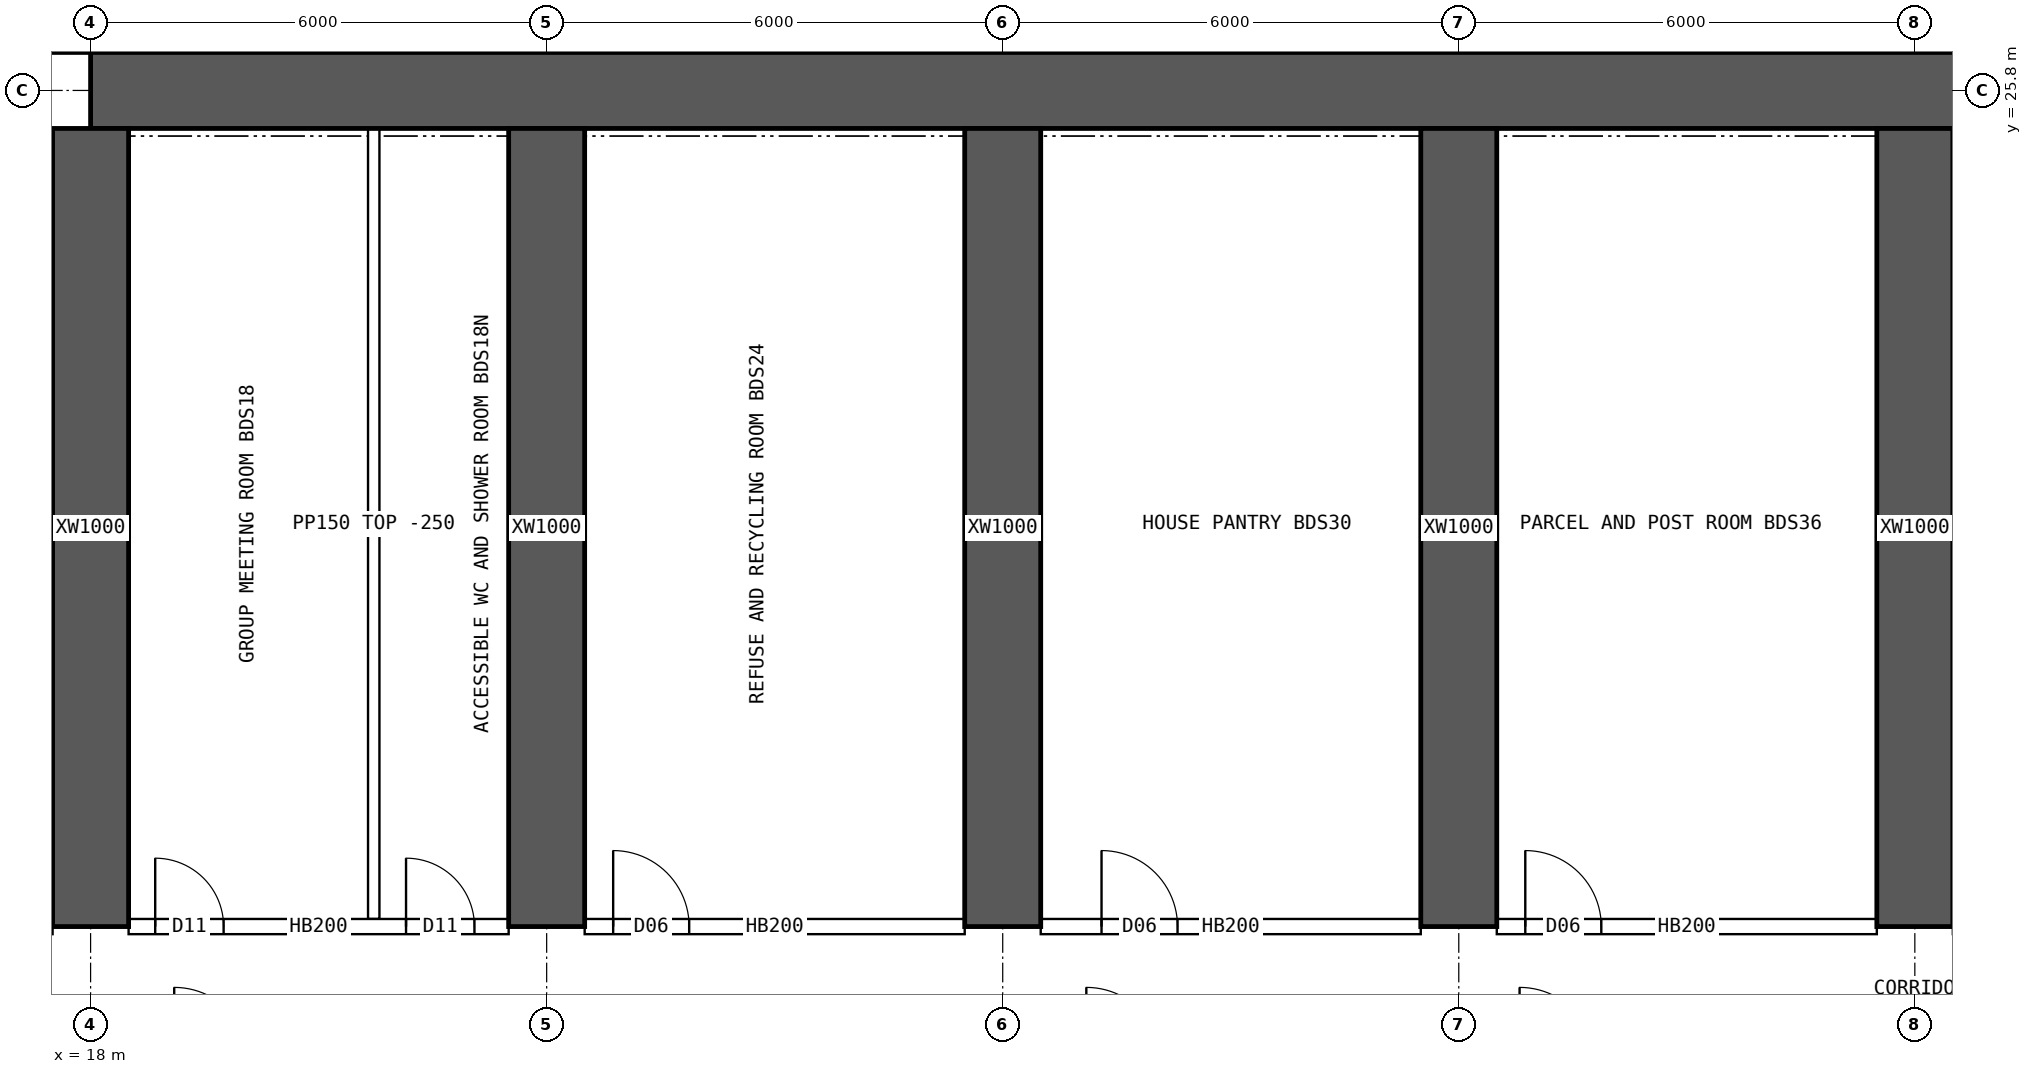
"""IFC4 building model, lengths in metres.
Left out: names, types, materials, properties, quantities, classifications, styles, units other than length and angle.
Written with IfcOpenShell. Run it as: python <this file> out.ifc"""

import sys

from ifc_helpers import new_model, si_unit, direction, frame, frame_2d, origin, place, context, subcontext, project, spatial, rectangle, extrude, element, fill, save


model = new_model("IFC4")
c1 = context("Model", 3, precision=1e-05, world=origin(), true_north=direction((0.0, 1.0)))
c2 = subcontext(c1, "Body", "Model", "MODEL_VIEW")
j1 = project(units=[si_unit("LENGTHUNIT", "METRE"), si_unit("PLANEANGLEUNIT", "RADIAN")], contexts=[c1])
p1 = place(None, origin())
s1 = spatial("IfcSite", under=j1, at=p1, CompositionType="ELEMENT")
p2 = place(p1, origin())
s2 = spatial("IfcBuilding", under=s1, at=p2, CompositionType="ELEMENT")
p3 = place(p2, frame((0.0, 0.0, 61.45)))
s3 = spatial("IfcBuildingStorey", under=s2, at=p3, CompositionType="ELEMENT", Elevation=61.45)
p4 = place(p3, frame((18.0, 25.8, 0.0), z_axis=(0.0, 0.0, 1.0), x_axis=(1.0, 0.0, 0.0)))
e1 = element("IfcWall", 1, at=p4, inside=s3, PredefinedType="SHEAR", context=c2, shape_type="SweptSolid", body=[
    extrude(rectangle(XDim=48.0, YDim=1.0, at=frame_2d((24.0, 0.0))), origin(), (0.0, 0.0, 1.0), 3.75),
])
for number, where, z_axis, x_axis in (
    (2, (18.0, 14.8, 0.0), (0.0, 0.0, 1.0), (0.0, 1.0, 0.0)),
    (3, (24.0, 14.8, 0.0), (0.0, 0.0, 1.0), (0.0, 1.0, 0.0)),
    (4, (30.0, 14.8, 0.0), (0.0, 0.0, 1.0), (0.0, 1.0, 0.0)),
    (5, (36.0, 14.8, 0.0), (0.0, 0.0, 1.0), (0.0, 1.0, 0.0)),
    (6, (42.0, 14.8, 0.0), (0.0, 0.0, 1.0), (0.0, 1.0, 0.0)),
):
    element("IfcWall", number, at=place(p3, frame(where, z_axis=z_axis, x_axis=x_axis)), inside=s3, PredefinedType="SHEAR", context=c2, shape_type="SweptSolid", body=[
        extrude(rectangle(XDim=10.5, YDim=1.0, at=frame_2d((5.25, 0.0))), origin(), (0.0, 0.0, 1.0), 3.75),
    ])
p5 = place(p3, frame((18.5, 14.8, 0.0), z_axis=(0.0, 0.0, 1.0), x_axis=(1.0, 0.0, 0.0)))
e7 = element("IfcWall", 7, at=p5, inside=s3, PredefinedType="SOLIDWALL", context=c2, shape_type="SweptSolid", body=[
    extrude(rectangle(XDim=5.0, YDim=0.2, at=frame_2d((2.5, 0.0))), origin(), (0.0, 0.0, 1.0), 3.5),
])
p6 = place(p5, frame((0.35, 0.0, 0.0)))
e8 = element("IfcOpeningElement", 8, at=p6, cuts=e7, PredefinedType="OPENING", context=c2, shape_type="SweptSolid", body=[
    extrude(rectangle(XDim=0.9, YDim=2.1, at=frame_2d((0.45, 1.05))), frame((0.0, 0.11, 0.0), z_axis=(0.0, -1.0, 0.0), x_axis=(1.0, 0.0, 0.0)), (0.0, 0.0, 1.0), 0.22),
])
p7 = place(p5, frame((3.65, 0.0, 0.0)))
e9 = element("IfcOpeningElement", 9, at=p7, cuts=e7, PredefinedType="OPENING", context=c2, shape_type="SweptSolid", body=[
    extrude(rectangle(XDim=0.9, YDim=2.1, at=frame_2d((0.45, 1.05))), frame((0.0, 0.11, 0.0), z_axis=(0.0, -1.0, 0.0), x_axis=(1.0, 0.0, 0.0)), (0.0, 0.0, 1.0), 0.22),
])
p8 = place(p3, frame((24.5, 14.8, 0.0), z_axis=(0.0, 0.0, 1.0), x_axis=(1.0, 0.0, 0.0)))
e10 = element("IfcWall", 10, at=p8, inside=s3, PredefinedType="SOLIDWALL", context=c2, shape_type="SweptSolid", body=[
    extrude(rectangle(XDim=5.0, YDim=0.2, at=frame_2d((2.5, 0.0))), origin(), (0.0, 0.0, 1.0), 3.5),
])
p9 = place(p8, frame((0.375, 0.0, 0.0)))
e11 = element("IfcOpeningElement", 11, at=p9, cuts=e10, PredefinedType="OPENING", context=c2, shape_type="SweptSolid", body=[
    extrude(rectangle(XDim=1.0, YDim=2.1, at=frame_2d((0.5, 1.05))), frame((0.0, 0.11, 0.0), z_axis=(0.0, -1.0, 0.0), x_axis=(1.0, 0.0, 0.0)), (0.0, 0.0, 1.0), 0.22),
])
p10 = place(p3, frame((30.5, 14.8, 0.0), z_axis=(0.0, 0.0, 1.0), x_axis=(1.0, 0.0, 0.0)))
e12 = element("IfcWall", 12, at=p10, inside=s3, PredefinedType="SOLIDWALL", context=c2, shape_type="SweptSolid", body=[
    extrude(rectangle(XDim=5.0, YDim=0.2, at=frame_2d((2.5, 0.0))), origin(), (0.0, 0.0, 1.0), 3.5),
])
p11 = place(p10, frame((0.8, 0.0, 0.0)))
e13 = element("IfcOpeningElement", 13, at=p11, cuts=e12, PredefinedType="OPENING", context=c2, shape_type="SweptSolid", body=[
    extrude(rectangle(XDim=1.0, YDim=2.1, at=frame_2d((0.5, 1.05))), frame((0.0, 0.11, 0.0), z_axis=(0.0, -1.0, 0.0), x_axis=(1.0, 0.0, 0.0)), (0.0, 0.0, 1.0), 0.22),
])
p12 = place(p3, frame((36.5, 14.8, 0.0), z_axis=(0.0, 0.0, 1.0), x_axis=(1.0, 0.0, 0.0)))
e14 = element("IfcWall", 14, at=p12, inside=s3, PredefinedType="SOLIDWALL", context=c2, shape_type="SweptSolid", body=[
    extrude(rectangle(XDim=5.0, YDim=0.2, at=frame_2d((2.5, 0.0))), origin(), (0.0, 0.0, 1.0), 3.5),
])
p13 = place(p12, frame((0.375, 0.0, 0.0)))
e15 = element("IfcOpeningElement", 15, at=p13, cuts=e14, PredefinedType="OPENING", context=c2, shape_type="SweptSolid", body=[
    extrude(rectangle(XDim=1.0, YDim=2.1, at=frame_2d((0.5, 1.05))), frame((0.0, 0.11, 0.0), z_axis=(0.0, -1.0, 0.0), x_axis=(1.0, 0.0, 0.0)), (0.0, 0.0, 1.0), 0.22),
])
p14 = place(p3, frame((21.725, 14.9, 0.0), z_axis=(0.0, 0.0, 1.0), x_axis=(0.0, 1.0, 0.0)))
e16 = element("IfcWall", 16, at=p14, inside=s3, PredefinedType="PARTITIONING", context=c2, shape_type="SweptSolid", body=[
    extrude(rectangle(XDim=10.4, YDim=0.15, at=frame_2d((5.2, 0.0))), origin(), (0.0, 0.0, 1.0), 3.5),
])
p15 = place(p6, origin())
e17 = element("IfcDoor", 17, at=p15, inside=s3, OperationType="SINGLE_SWING_LEFT", PredefinedType="DOOR", context=c2, shape_type="SweptSolid", body=[
    extrude(rectangle(XDim=0.9, YDim=2.1, at=frame_2d((0.45, 1.05))), frame((0.0, 0.025, 0.0), z_axis=(0.0, -1.0, 0.0), x_axis=(1.0, 0.0, 0.0)), (0.0, 0.0, 1.0), 0.05),
])
fill(e8, e17)
p16 = place(p7, origin())
e18 = element("IfcDoor", 18, at=p16, inside=s3, OperationType="SINGLE_SWING_LEFT", PredefinedType="DOOR", context=c2, shape_type="SweptSolid", body=[
    extrude(rectangle(XDim=0.9, YDim=2.1, at=frame_2d((0.45, 1.05))), frame((0.0, 0.025, 0.0), z_axis=(0.0, -1.0, 0.0), x_axis=(1.0, 0.0, 0.0)), (0.0, 0.0, 1.0), 0.05),
])
fill(e9, e18)
p17 = place(p9, origin())
e19 = element("IfcDoor", 19, at=p17, inside=s3, OperationType="SINGLE_SWING_LEFT", PredefinedType="DOOR", context=c2, shape_type="SweptSolid", body=[
    extrude(rectangle(XDim=1.0, YDim=2.1, at=frame_2d((0.5, 1.05))), frame((0.0, 0.025, 0.0), z_axis=(0.0, -1.0, 0.0), x_axis=(1.0, 0.0, 0.0)), (0.0, 0.0, 1.0), 0.05),
])
fill(e11, e19)
p18 = place(p11, origin())
e20 = element("IfcDoor", 20, at=p18, inside=s3, OperationType="SINGLE_SWING_LEFT", PredefinedType="DOOR", context=c2, shape_type="SweptSolid", body=[
    extrude(rectangle(XDim=1.0, YDim=2.1, at=frame_2d((0.5, 1.05))), frame((0.0, 0.025, 0.0), z_axis=(0.0, -1.0, 0.0), x_axis=(1.0, 0.0, 0.0)), (0.0, 0.0, 1.0), 0.05),
])
fill(e13, e20)
p19 = place(p13, origin())
e21 = element("IfcDoor", 21, at=p19, inside=s3, OperationType="SINGLE_SWING_LEFT", PredefinedType="DOOR", context=c2, shape_type="SweptSolid", body=[
    extrude(rectangle(XDim=1.0, YDim=2.1, at=frame_2d((0.5, 1.05))), frame((0.0, 0.025, 0.0), z_axis=(0.0, -1.0, 0.0), x_axis=(1.0, 0.0, 0.0)), (0.0, 0.0, 1.0), 0.05),
])
fill(e15, e21)
save(model, sys.argv[1])
